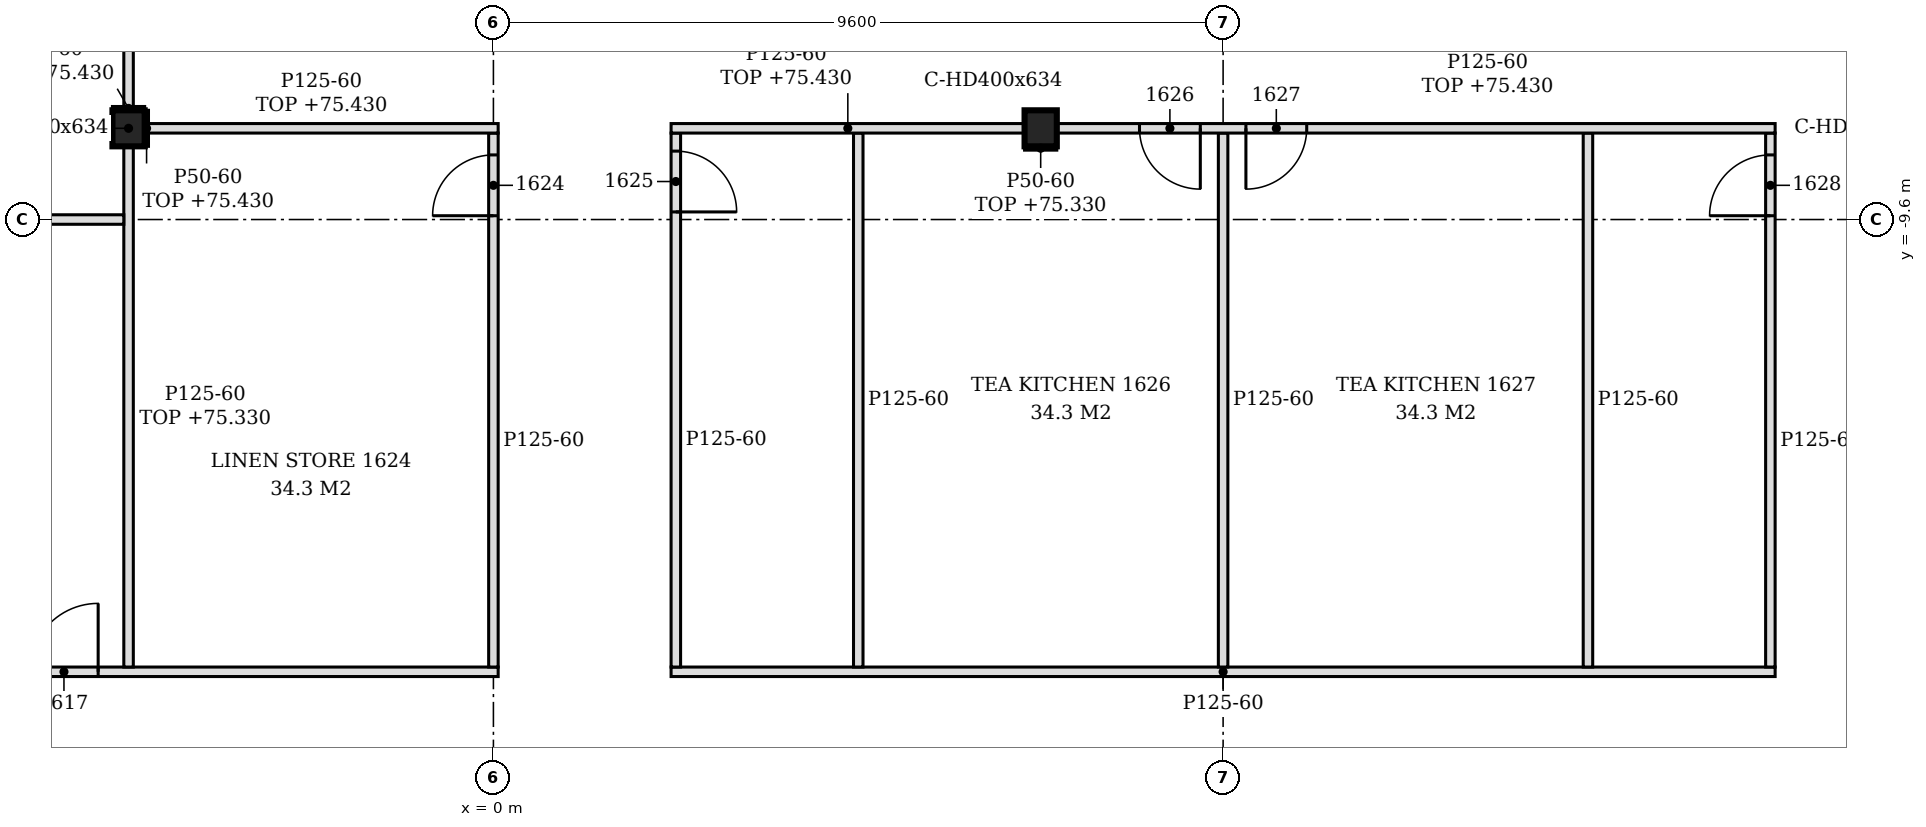
"""IFC4 building model, lengths in metres.
Left out: names, types, materials, properties, quantities, classifications, styles, units other than length and angle.
Written with IfcOpenShell. Run it as: python <this file> out.ifc"""

import sys

from ifc_helpers import new_model, si_unit, direction, frame, frame_2d, origin, origin_2d, place, context, subcontext, project, spatial, polyline, rectangle, i_section, outline, extrude, element, fill, save


model = new_model("IFC4")
c1 = context("Model", 3, precision=1e-05, world=origin(), true_north=direction((0.0, 1.0)))
c2 = subcontext(c1, "Body", "Model", "MODEL_VIEW")
j1 = project(units=[si_unit("LENGTHUNIT", "METRE"), si_unit("PLANEANGLEUNIT", "RADIAN")], contexts=[c1])
p1 = place(None, origin())
s1 = spatial("IfcSite", under=j1, at=p1, CompositionType="ELEMENT")
p2 = place(p1, origin())
s2 = spatial("IfcBuilding", under=s1, at=p2, CompositionType="ELEMENT")
p3 = place(p2, frame((0.0, 0.0, 72.6)))
s3 = spatial("IfcBuildingStorey", under=s2, at=p3, CompositionType="ELEMENT", Elevation=72.6)
for number, where, z_axis, x_axis in (
    (1, (-4.8, -8.4, -0.15), (0.0, 0.0, 1.0), (1.0, 0.0, 0.0)),
    (2, (7.2, -8.4, -0.15), (0.0, 0.0, 1.0), (1.0, 0.0, 0.0)),
):
    element("IfcColumn", number, at=place(p3, frame(where, z_axis=z_axis, x_axis=x_axis)), inside=s3, PredefinedType="COLUMN", context=c2, shape_type="SweptSolid", body=[
        extrude(i_section(OverallWidth=0.424, OverallDepth=0.474, WebThickness=0.048, FlangeThickness=0.077, FilletRadius=0.015, at=origin_2d()), origin(), (0.0, 0.0, 1.0), 3.6),
    ])
p4 = place(p3, frame((-18.413, -15.55, 0.0), z_axis=(0.0, 0.0, 1.0), x_axis=(1.0, 0.0, 0.0)))
e3 = element("IfcWall", 3, at=p4, inside=s3, PredefinedType="PARTITIONING", context=c2, shape_type="SweptSolid", body=[
    extrude(outline(polyline([(0.0, 0.0), (18.475, 0.0), (18.475, 3.45), (13.762, 3.45), (13.76, 2.73), (13.462, 2.73), (13.46, 3.45), (4.163, 3.45), (4.16, 2.93), (3.863, 2.93), (3.861, 3.45), (0.0, 3.45), (0.0, 0.0)])), frame((0.0, 0.062, 0.0), z_axis=(0.0, -1.0, 0.0), x_axis=(1.0, 0.0, 0.0)), (0.0, 0.0, 1.0), 0.125),
])
p5 = place(p4, frame((12.312, 0.0, 0.0)))
e4 = element("IfcOpeningElement", 4, at=p5, cuts=e3, PredefinedType="OPENING", context=c2, shape_type="SweptSolid", body=[
    extrude(rectangle(XDim=0.9, YDim=2.1, at=frame_2d((0.45, 1.05))), frame((0.0, 0.073, 0.0), z_axis=(0.0, -1.0, 0.0), x_axis=(1.0, 0.0, 0.0)), (0.0, 0.0, 1.0), 0.145),
])
p6 = place(p3, frame((2.337, -15.55, 0.0), z_axis=(0.0, 0.0, 1.0), x_axis=(1.0, 0.0, 0.0)))
e5 = element("IfcWall", 5, at=p6, inside=s3, PredefinedType="PARTITIONING", context=c2, shape_type="SweptSolid", body=[
    extrude(outline(polyline([(0.0, 0.0), (14.525, 0.0), (14.525, 3.45), (5.012, 3.45), (5.01, 2.73), (4.712, 2.73), (4.71, 3.45), (0.0, 3.45), (0.0, 0.0)])), frame((0.0, 0.062, 0.0), z_axis=(0.0, -1.0, 0.0), x_axis=(1.0, 0.0, 0.0)), (0.0, 0.0, 1.0), 0.125),
])
p7 = place(p3, frame((-4.8, -15.488, 0.0), z_axis=(0.0, 0.0, 1.0), x_axis=(0.0, 1.0, 0.0)))
e6 = element("IfcWall", 6, at=p7, inside=s3, PredefinedType="PARTITIONING", context=c2, shape_type="SweptSolid", body=[
    extrude(rectangle(XDim=6.851, YDim=0.125, at=frame_2d((3.425, 0.0))), origin(), (0.0, 0.0, 1.0), 2.73),
])
p8 = place(p3, frame((0.0, -15.488, 0.0), z_axis=(0.0, 0.0, 1.0), x_axis=(0.0, 1.0, 0.0)))
e7 = element("IfcWall", 7, at=p8, inside=s3, PredefinedType="PARTITIONING", context=c2, shape_type="SweptSolid", body=[
    extrude(outline(polyline([(0.0, 0.0), (7.025, 0.0), (7.025, 2.83), (6.938, 2.83), (6.936, 3.45), (1.192, 3.45), (1.19, 2.88), (0.982, 2.88), (0.98, 3.45), (0.0, 3.45), (0.0, 0.0)])), frame((0.0, 0.062, 0.0), z_axis=(0.0, -1.0, 0.0), x_axis=(1.0, 0.0, 0.0)), (0.0, 0.0, 1.0), 0.125),
])
p9 = place(p8, frame((5.938, 0.0, 0.0)))
e8 = element("IfcOpeningElement", 8, at=p9, cuts=e7, PredefinedType="OPENING", context=c2, shape_type="SweptSolid", body=[
    extrude(rectangle(XDim=0.8, YDim=2.1, at=frame_2d((0.4, 1.05))), frame((0.0, 0.073, 0.0), z_axis=(0.0, -1.0, 0.0), x_axis=(1.0, 0.0, 0.0)), (0.0, 0.0, 1.0), 0.145),
])
p10 = place(p3, frame((2.4, -15.488, 0.0), z_axis=(0.0, 0.0, 1.0), x_axis=(0.0, 1.0, 0.0)))
e9 = element("IfcWall", 9, at=p10, inside=s3, PredefinedType="PARTITIONING", context=c2, shape_type="SweptSolid", body=[
    extrude(outline(polyline([(0.0, 0.0), (7.025, 0.0), (7.025, 2.83), (6.938, 2.83), (6.936, 3.45), (1.192, 3.45), (1.19, 2.88), (0.982, 2.88), (0.98, 3.45), (0.0, 3.45), (0.0, 0.0)])), frame((0.0, 0.062, 0.0), z_axis=(0.0, -1.0, 0.0), x_axis=(1.0, 0.0, 0.0)), (0.0, 0.0, 1.0), 0.125),
])
p11 = place(p10, frame((5.988, 0.0, 0.0)))
e10 = element("IfcOpeningElement", 10, at=p11, cuts=e9, PredefinedType="OPENING", context=c2, shape_type="SweptSolid", body=[
    extrude(rectangle(XDim=0.8, YDim=2.1, at=frame_2d((0.4, 1.05))), frame((0.0, 0.073, 0.0), z_axis=(0.0, -1.0, 0.0), x_axis=(1.0, 0.0, 0.0)), (0.0, 0.0, 1.0), 0.145),
])
for number, where, z_axis, x_axis in (
    (11, (4.8, -15.488, 0.0), (0.0, 0.0, 1.0), (0.0, 1.0, 0.0)),
    (12, (9.6, -15.488, 0.0), (0.0, 0.0, 1.0), (0.0, 1.0, 0.0)),
    (13, (14.4, -15.488, 0.0), (0.0, 0.0, 1.0), (0.0, 1.0, 0.0)),
):
    element("IfcWall", number, at=place(p3, frame(where, z_axis=z_axis, x_axis=x_axis)), inside=s3, PredefinedType="PARTITIONING", context=c2, shape_type="SweptSolid", body=[
        extrude(outline(polyline([(0.0, 0.0), (7.025, 0.0), (7.025, 2.83), (6.938, 2.83), (6.936, 3.45), (1.192, 3.45), (1.19, 2.88), (0.982, 2.88), (0.98, 3.45), (0.0, 3.45), (0.0, 0.0)])), frame((0.0, 0.062, 0.0), z_axis=(0.0, -1.0, 0.0), x_axis=(1.0, 0.0, 0.0)), (0.0, 0.0, 1.0), 0.125),
    ])
p12 = place(p3, frame((16.8, -15.488, 0.0), z_axis=(0.0, 0.0, 1.0), x_axis=(0.0, 1.0, 0.0)))
e14 = element("IfcWall", 14, at=p12, inside=s3, PredefinedType="PARTITIONING", context=c2, shape_type="SweptSolid", body=[
    extrude(outline(polyline([(0.0, 0.0), (7.025, 0.0), (7.025, 2.83), (6.938, 2.83), (6.936, 3.45), (1.192, 3.45), (1.19, 2.88), (0.982, 2.88), (0.98, 3.45), (0.0, 3.45), (0.0, 0.0)])), frame((0.0, 0.062, 0.0), z_axis=(0.0, -1.0, 0.0), x_axis=(1.0, 0.0, 0.0)), (0.0, 0.0, 1.0), 0.125),
])
p13 = place(p12, frame((5.938, 0.0, 0.0)))
e15 = element("IfcOpeningElement", 15, at=p13, cuts=e14, PredefinedType="OPENING", context=c2, shape_type="SweptSolid", body=[
    extrude(rectangle(XDim=0.8, YDim=2.1, at=frame_2d((0.4, 1.05))), frame((0.0, 0.073, 0.0), z_axis=(0.0, -1.0, 0.0), x_axis=(1.0, 0.0, 0.0)), (0.0, 0.0, 1.0), 0.145),
])
p14 = place(p3, frame((-14.196, -9.6, 0.0), z_axis=(0.0, 0.0, 1.0), x_axis=(1.0, 0.0, 0.0)))
e16 = element("IfcWall", 16, at=p14, inside=s3, PredefinedType="PARTITIONING", context=c2, shape_type="SweptSolid", body=[
    extrude(outline(polyline([(0.0, 0.0), (9.333, 0.0), (9.333, 2.73), (9.246, 2.73), (9.243, 2.93), (0.0, 2.93), (0.0, 0.0)])), frame((0.0, 0.062, 0.0), z_axis=(0.0, -1.0, 0.0), x_axis=(1.0, 0.0, 0.0)), (0.0, 0.0, 1.0), 0.125),
])
p15 = place(p3, frame((-4.588, -8.4, 0.0), z_axis=(0.0, 0.0, 1.0), x_axis=(1.0, 0.0, 0.0)))
e17 = element("IfcWall", 17, at=p15, inside=s3, PredefinedType="PARTITIONING", context=c2, shape_type="SweptSolid", body=[
    extrude(rectangle(XDim=4.65, YDim=0.125, at=frame_2d((2.325, 0.0))), origin(), (0.0, 0.0, 1.0), 2.83),
])
p16 = place(p3, frame((2.337, -8.4, 0.0), z_axis=(0.0, 0.0, 1.0), x_axis=(1.0, 0.0, 0.0)))
e18 = element("IfcWall", 18, at=p16, inside=s3, PredefinedType="PARTITIONING", context=c2, shape_type="SweptSolid", body=[
    extrude(rectangle(XDim=4.651, YDim=0.125, at=frame_2d((2.325, 0.0))), origin(), (0.0, 0.0, 1.0), 2.83),
])
p17 = place(p3, frame((7.412, -8.4, 0.0), z_axis=(0.0, 0.0, 1.0), x_axis=(1.0, 0.0, 0.0)))
e19 = element("IfcWall", 19, at=p17, inside=s3, PredefinedType="PARTITIONING", context=c2, shape_type="SweptSolid", body=[
    extrude(rectangle(XDim=9.45, YDim=0.125, at=frame_2d((4.725, 0.0))), origin(), (0.0, 0.0, 1.0), 2.83),
])
p18 = place(p17, frame((1.088, 0.0, 0.0)))
e20 = element("IfcOpeningElement", 20, at=p18, cuts=e19, PredefinedType="OPENING", context=c2, shape_type="SweptSolid", body=[
    extrude(rectangle(XDim=0.8, YDim=2.1, at=frame_2d((0.4, 1.05))), frame((0.0, 0.073, 0.0), z_axis=(0.0, -1.0, 0.0), x_axis=(1.0, 0.0, 0.0)), (0.0, 0.0, 1.0), 0.145),
])
p19 = place(p17, frame((2.488, 0.0, 0.0)))
e21 = element("IfcOpeningElement", 21, at=p19, cuts=e19, PredefinedType="OPENING", context=c2, shape_type="SweptSolid", body=[
    extrude(rectangle(XDim=0.8, YDim=2.1, at=frame_2d((0.4, 1.05))), frame((0.0, 0.073, 0.0), z_axis=(0.0, -1.0, 0.0), x_axis=(1.0, 0.0, 0.0)), (0.0, 0.0, 1.0), 0.145),
])
p20 = place(p3, frame((-4.8, -8.163, 0.0), z_axis=(0.0, 0.0, 1.0), x_axis=(0.0, 1.0, 0.0)))
e22 = element("IfcWall", 22, at=p20, inside=s3, PredefinedType="PARTITIONING", context=c2, shape_type="SweptSolid", body=[
    extrude(rectangle(XDim=8.101, YDim=0.125, at=frame_2d((4.05, 0.0))), origin(), (0.0, 0.0, 1.0), 2.83),
])
p21 = place(p20, frame((2.163, 0.0, 0.0)))
e23 = element("IfcOpeningElement", 23, at=p21, cuts=e22, PredefinedType="OPENING", context=c2, shape_type="SweptSolid", body=[
    extrude(rectangle(XDim=0.9, YDim=2.1, at=frame_2d((0.45, 1.05))), frame((0.0, 0.073, 0.0), z_axis=(0.0, -1.0, 0.0), x_axis=(1.0, 0.0, 0.0)), (0.0, 0.0, 1.0), 0.145),
])
p22 = place(p3, frame((-4.563, -8.637, 0.0), z_axis=(0.0, 0.0, 1.0), x_axis=(0.0, 1.0, 0.0)))
e24 = element("IfcWall", 24, at=p22, inside=s3, PredefinedType="PARTITIONING", context=c2, shape_type="SweptSolid", body=[
    extrude(rectangle(XDim=0.474, YDim=0.05, at=frame_2d((0.237, 0.0))), origin(), (0.0, 0.0, 1.0), 2.83),
])
p23 = place(p3, frame((-5.012, -8.138, 0.0), z_axis=(0.0, 0.0, 1.0), x_axis=(1.0, 0.0, 0.0)))
e25 = element("IfcWall", 25, at=p23, inside=s3, PredefinedType="PARTITIONING", context=c2, shape_type="SweptSolid", body=[
    extrude(rectangle(XDim=0.424, YDim=0.05, at=frame_2d((0.212, 0.0))), origin(), (0.0, 0.0, 1.0), 2.83),
])
p24 = place(p3, frame((6.988, -8.662, 0.0), z_axis=(0.0, 0.0, 1.0), x_axis=(1.0, 0.0, 0.0)))
e26 = element("IfcWall", 26, at=p24, inside=s3, PredefinedType="PARTITIONING", context=c2, shape_type="SweptSolid", body=[
    extrude(rectangle(XDim=0.424, YDim=0.05, at=frame_2d((0.212, 0.0))), origin(), (0.0, 0.0, 1.0), 2.73),
])
p25 = place(p5, origin())
e27 = element("IfcDoor", 27, at=p25, inside=s3, OperationType="SINGLE_SWING_RIGHT", PredefinedType="DOOR", context=c2, shape_type="SweptSolid", body=[
    extrude(rectangle(XDim=0.9, YDim=2.1, at=frame_2d((0.45, 1.05))), frame((0.0, 0.025, 0.0), z_axis=(0.0, -1.0, 0.0), x_axis=(1.0, 0.0, 0.0)), (0.0, 0.0, 1.0), 0.05),
])
fill(e4, e27)
p26 = place(p9, origin())
e28 = element("IfcDoor", 28, at=p26, inside=s3, OperationType="SINGLE_SWING_LEFT", PredefinedType="DOOR", context=c2, shape_type="SweptSolid", body=[
    extrude(rectangle(XDim=0.8, YDim=2.1, at=frame_2d((0.4, 1.05))), frame((0.0, 0.025, 0.0), z_axis=(0.0, -1.0, 0.0), x_axis=(1.0, 0.0, 0.0)), (0.0, 0.0, 1.0), 0.05),
])
fill(e8, e28)
p27 = place(p11, frame((0.8, 0.0, 0.0), z_axis=(0.0, 0.0, 1.0), x_axis=(-1.0, 0.0, 0.0)))
e29 = element("IfcDoor", 29, at=p27, inside=s3, OperationType="SINGLE_SWING_RIGHT", PredefinedType="DOOR", context=c2, shape_type="SweptSolid", body=[
    extrude(rectangle(XDim=0.8, YDim=2.1, at=frame_2d((0.4, 1.05))), frame((0.0, 0.025, 0.0), z_axis=(0.0, -1.0, 0.0), x_axis=(1.0, 0.0, 0.0)), (0.0, 0.0, 1.0), 0.05),
])
fill(e10, e29)
p28 = place(p18, frame((0.8, 0.0, 0.0), z_axis=(0.0, 0.0, 1.0), x_axis=(-1.0, 0.0, 0.0)))
e30 = element("IfcDoor", 30, at=p28, inside=s3, OperationType="SINGLE_SWING_LEFT", PredefinedType="DOOR", context=c2, shape_type="SweptSolid", body=[
    extrude(rectangle(XDim=0.8, YDim=2.1, at=frame_2d((0.4, 1.05))), frame((0.0, 0.025, 0.0), z_axis=(0.0, -1.0, 0.0), x_axis=(1.0, 0.0, 0.0)), (0.0, 0.0, 1.0), 0.05),
])
fill(e20, e30)
p29 = place(p19, frame((0.8, 0.0, 0.0), z_axis=(0.0, 0.0, 1.0), x_axis=(-1.0, 0.0, 0.0)))
e31 = element("IfcDoor", 31, at=p29, inside=s3, OperationType="SINGLE_SWING_RIGHT", PredefinedType="DOOR", context=c2, shape_type="SweptSolid", body=[
    extrude(rectangle(XDim=0.8, YDim=2.1, at=frame_2d((0.4, 1.05))), frame((0.0, 0.025, 0.0), z_axis=(0.0, -1.0, 0.0), x_axis=(1.0, 0.0, 0.0)), (0.0, 0.0, 1.0), 0.05),
])
fill(e21, e31)
p30 = place(p13, origin())
e32 = element("IfcDoor", 32, at=p30, inside=s3, OperationType="SINGLE_SWING_LEFT", PredefinedType="DOOR", context=c2, shape_type="SweptSolid", body=[
    extrude(rectangle(XDim=0.8, YDim=2.1, at=frame_2d((0.4, 1.05))), frame((0.0, 0.025, 0.0), z_axis=(0.0, -1.0, 0.0), x_axis=(1.0, 0.0, 0.0)), (0.0, 0.0, 1.0), 0.05),
])
fill(e15, e32)
save(model, sys.argv[1])
